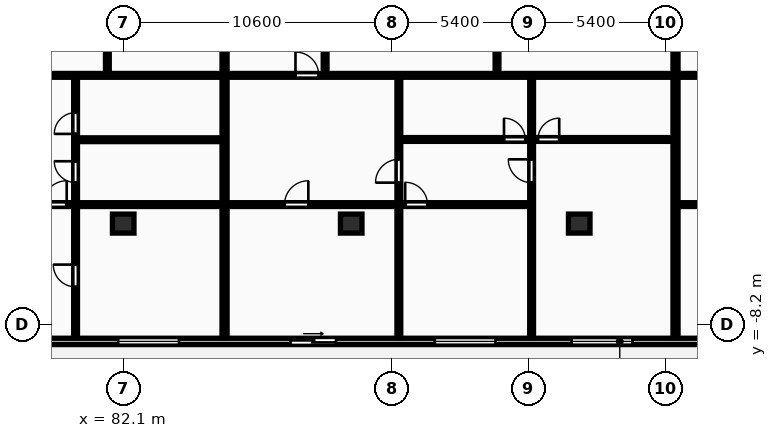
"""IFC4 building model, lengths in metres.
Left out: names, types, materials, properties, quantities, classifications, styles, units other than length and angle.
Written with IfcOpenShell. Run it as: python <this file> out.ifc"""

import sys

from ifc_helpers import new_model, si_unit, direction, frame, frame_2d, origin, origin_2d, place, context, subcontext, project, spatial, rectangle, extrude, element, fill, save


model = new_model("IFC4")
c1 = context("Model", 3, precision=1e-05, world=origin(), true_north=direction((0.0, 1.0)))
c2 = subcontext(c1, "Body", "Model", "MODEL_VIEW")
j1 = project(units=[si_unit("LENGTHUNIT", "METRE"), si_unit("PLANEANGLEUNIT", "RADIAN")], contexts=[c1])
p1 = place(None, origin())
s1 = spatial("IfcSite", under=j1, at=p1, CompositionType="ELEMENT")
p2 = place(p1, origin())
s2 = spatial("IfcBuilding", under=s1, at=p2, CompositionType="ELEMENT")
p3 = place(p2, frame((0.0, 0.0, 87.3)))
s3 = spatial("IfcBuildingStorey", under=s2, at=p3, CompositionType="ELEMENT", Elevation=87.3)
for number, where, z_axis, x_axis in (
    (1, (82.1, -4.2, 0.0), (0.0, 0.0, 1.0), (1.0, 0.0, 0.0)),
    (2, (91.1, -4.2, 0.0), (0.0, 0.0, 1.0), (1.0, 0.0, 0.0)),
    (3, (100.1, -4.2, 0.0), (0.0, 0.0, 1.0), (1.0, 0.0, 0.0)),
):
    element("IfcColumn", number, at=place(p3, frame(where, z_axis=z_axis, x_axis=x_axis)), inside=s3, PredefinedType="COLUMN", context=c2, shape_type="SweptSolid", body=[
        extrude(rectangle(XDim=0.85, YDim=0.75, at=origin_2d()), origin(), (0.0, 0.0, 1.0), 3.25),
    ])
p4 = place(p3, frame((72.7, -8.85, 0.0), z_axis=(0.0, 0.0, 1.0), x_axis=(1.0, 0.0, 0.0)))
e4 = element("IfcWall", 4, at=p4, inside=s3, PredefinedType="STANDARD", context=c2, shape_type="SweptSolid", body=[
    extrude(rectangle(XDim=58.0, YDim=0.25, at=frame_2d((29.0, 0.0))), origin(), (0.0, 0.0, 1.0), 2.97),
])
p5 = place(p4, frame((2.92, 0.0, 0.0)))
e5 = element("IfcOpeningElement", 5, at=p5, cuts=e4, PredefinedType="OPENING", context=c2, shape_type="SweptSolid", body=[
    extrude(rectangle(XDim=1.8, YDim=2.2, at=frame_2d((0.9, 1.1))), frame((0.0, 0.135, 0.0), z_axis=(0.0, -1.0, 0.0), x_axis=(1.0, 0.0, 0.0)), (0.0, 0.0, 1.0), 0.27),
])
p6 = place(p4, frame((9.2, 0.0, 0.85)))
e6 = element("IfcOpeningElement", 6, at=p6, cuts=e4, PredefinedType="OPENING", context=c2, shape_type="SweptSolid", body=[
    extrude(rectangle(XDim=2.4, YDim=1.9, at=frame_2d((1.2, 0.95))), frame((0.0, 0.135, 0.0), z_axis=(0.0, -1.0, 0.0), x_axis=(1.0, 0.0, 0.0)), (0.0, 0.0, 1.0), 0.27),
])
p7 = place(p4, frame((21.7, 0.0, 0.85)))
e7 = element("IfcOpeningElement", 7, at=p7, cuts=e4, PredefinedType="OPENING", context=c2, shape_type="SweptSolid", body=[
    extrude(rectangle(XDim=2.4, YDim=1.9, at=frame_2d((1.2, 0.95))), frame((0.0, 0.135, 0.0), z_axis=(0.0, -1.0, 0.0), x_axis=(1.0, 0.0, 0.0)), (0.0, 0.0, 1.0), 0.27),
])
p8 = place(p4, frame((16.0, 0.0, 0.0)))
e8 = element("IfcOpeningElement", 8, at=p8, cuts=e4, PredefinedType="OPENING", context=c2, shape_type="SweptSolid", body=[
    extrude(rectangle(XDim=1.8, YDim=2.2, at=frame_2d((0.9, 1.1))), frame((0.0, 0.135, 0.0), z_axis=(0.0, -1.0, 0.0), x_axis=(1.0, 0.0, 0.0)), (0.0, 0.0, 1.0), 0.27),
])
p9 = place(p4, frame((27.1, 0.0, 0.85)))
e9 = element("IfcOpeningElement", 9, at=p9, cuts=e4, PredefinedType="OPENING", context=c2, shape_type="SweptSolid", body=[
    extrude(rectangle(XDim=2.4, YDim=1.9, at=frame_2d((1.2, 0.95))), frame((0.0, 0.135, 0.0), z_axis=(0.0, -1.0, 0.0), x_axis=(1.0, 0.0, 0.0)), (0.0, 0.0, 1.0), 0.27),
])
p10 = place(p4, frame((35.85, 0.0, 0.0)))
e10 = element("IfcOpeningElement", 10, at=p10, cuts=e4, PredefinedType="OPENING", context=c2, shape_type="SweptSolid", body=[
    extrude(rectangle(XDim=1.8, YDim=2.2, at=frame_2d((0.9, 1.1))), frame((0.0, 0.135, 0.0), z_axis=(0.0, -1.0, 0.0), x_axis=(1.0, 0.0, 0.0)), (0.0, 0.0, 1.0), 0.27),
])
p11 = place(p4, frame((42.93, 0.0, 0.85)))
e11 = element("IfcOpeningElement", 11, at=p11, cuts=e4, PredefinedType="OPENING", context=c2, shape_type="SweptSolid", body=[
    extrude(rectangle(XDim=1.8, YDim=1.8, at=frame_2d((0.9, 0.9))), frame((0.0, 0.135, 0.0), z_axis=(0.0, -1.0, 0.0), x_axis=(1.0, 0.0, 0.0)), (0.0, 0.0, 1.0), 0.27),
])
p12 = place(p4, frame((49.12, 0.0, 0.0)))
e12 = element("IfcOpeningElement", 12, at=p12, cuts=e4, PredefinedType="OPENING", context=c2, shape_type="SweptSolid", body=[
    extrude(rectangle(XDim=1.8, YDim=2.2, at=frame_2d((0.9, 1.1))), frame((0.0, 0.135, 0.0), z_axis=(0.0, -1.0, 0.0), x_axis=(1.0, 0.0, 0.0)), (0.0, 0.0, 1.0), 0.27),
])
p13 = place(p4, frame((54.9, 0.0, 0.85)))
e13 = element("IfcOpeningElement", 13, at=p13, cuts=e4, PredefinedType="OPENING", context=c2, shape_type="SweptSolid", body=[
    extrude(rectangle(XDim=2.4, YDim=1.9, at=frame_2d((1.2, 0.95))), frame((0.0, 0.135, 0.0), z_axis=(0.0, -1.0, 0.0), x_axis=(1.0, 0.0, 0.0)), (0.0, 0.0, 1.0), 0.27),
])
p14 = place(p3, frame((86.1, -8.7, 0.0), z_axis=(0.0, 0.0, 1.0), x_axis=(0.0, 1.0, 0.0)))
e14 = element("IfcWall", 14, at=p14, inside=s3, PredefinedType="PARTITIONING", context=c2, shape_type="SweptSolid", body=[
    extrude(rectangle(XDim=24.87, YDim=0.2, at=frame_2d((12.435, 0.0))), origin(), (0.0, 0.0, 1.0), 2.97),
])
p15 = place(p3, frame((81.475, 1.69, 0.0), z_axis=(0.0, 0.0, 1.0), x_axis=(0.0, 1.0, 0.0)))
e15 = element("IfcWall", 15, at=p15, inside=s3, PredefinedType="PARTITIONING", context=c2, shape_type="SweptSolid", body=[
    extrude(rectangle(XDim=7.25, YDim=0.15, at=frame_2d((3.625, 0.0))), origin(), (0.0, 0.0, 1.0), 2.97),
])
p16 = place(p15, frame((2.558, 0.0, 0.0)))
e16 = element("IfcOpeningElement", 16, at=p16, cuts=e15, PredefinedType="OPENING", context=c2, shape_type="SweptSolid", body=[
    extrude(rectangle(XDim=0.84, YDim=2.04, at=frame_2d((0.42, 1.02))), frame((0.0, 0.085, 0.0), z_axis=(0.0, -1.0, 0.0), x_axis=(1.0, 0.0, 0.0)), (0.0, 0.0, 1.0), 0.17),
])
p17 = place(p3, frame((80.28, -0.89, 0.0), z_axis=(0.0, 0.0, 1.0), x_axis=(1.0, 0.0, 0.0)))
e17 = element("IfcWall", 17, at=p17, inside=s3, PredefinedType="PARTITIONING", context=c2, shape_type="SweptSolid", body=[
    extrude(rectangle(XDim=5.74, YDim=0.15, at=frame_2d((2.87, 0.0))), origin(), (0.0, 0.0, 1.0), 2.97),
])
p18 = place(p3, frame((80.22, -8.7, 0.0), z_axis=(0.0, 0.0, 1.0), x_axis=(0.0, 1.0, 0.0)))
e18 = element("IfcWall", 18, at=p18, inside=s3, PredefinedType="PARTITIONING", context=c2, shape_type="SweptSolid", body=[
    extrude(rectangle(XDim=10.31, YDim=0.15, at=frame_2d((5.155, 0.0))), origin(), (0.0, 0.0, 1.0), 2.97),
])
p19 = place(p18, frame((6.12, 0.0, 0.0)))
e19 = element("IfcOpeningElement", 19, at=p19, cuts=e18, PredefinedType="OPENING", context=c2, shape_type="SweptSolid", body=[
    extrude(rectangle(XDim=0.84, YDim=2.04, at=frame_2d((0.42, 1.02))), frame((0.0, 0.085, 0.0), z_axis=(0.0, -1.0, 0.0), x_axis=(1.0, 0.0, 0.0)), (0.0, 0.0, 1.0), 0.17),
])
p20 = place(p18, frame((8.04, 0.0, 0.0)))
e20 = element("IfcOpeningElement", 20, at=p20, cuts=e18, PredefinedType="OPENING", context=c2, shape_type="SweptSolid", body=[
    extrude(rectangle(XDim=0.84, YDim=2.04, at=frame_2d((0.42, 1.02))), frame((0.0, 0.085, 0.0), z_axis=(0.0, -1.0, 0.0), x_axis=(1.0, 0.0, 0.0)), (0.0, 0.0, 1.0), 0.17),
])
p21 = place(p18, frame((2.001, 0.0, 0.0)))
e21 = element("IfcOpeningElement", 21, at=p21, cuts=e18, PredefinedType="OPENING", context=c2, shape_type="SweptSolid", body=[
    extrude(rectangle(XDim=0.88, YDim=2.06, at=frame_2d((0.44, 1.03))), frame((0.0, 0.085, 0.0), z_axis=(0.0, -1.0, 0.0), x_axis=(1.0, 0.0, 0.0)), (0.0, 0.0, 1.0), 0.17),
])
p22 = place(p3, frame((72.78, 1.65, 0.0), z_axis=(0.0, 0.0, 1.0), x_axis=(1.0, 0.0, 0.0)))
e22 = element("IfcWall", 22, at=p22, inside=s3, PredefinedType="PARTITIONING", context=c2, shape_type="SweptSolid", body=[
    extrude(rectangle(XDim=13.24, YDim=0.15, at=frame_2d((6.62, 0.0))), origin(), (0.0, 0.0, 1.0), 2.97),
])
p23 = place(p22, frame((2.72, 0.0, 0.0)))
e23 = element("IfcOpeningElement", 23, at=p23, cuts=e22, PredefinedType="OPENING", context=c2, shape_type="SweptSolid", body=[
    extrude(rectangle(XDim=0.92, YDim=2.08, at=frame_2d((0.46, 1.04))), frame((0.0, 0.085, 0.0), z_axis=(0.0, -1.0, 0.0), x_axis=(1.0, 0.0, 0.0)), (0.0, 0.0, 1.0), 0.17),
])
p24 = place(p3, frame((72.78, -3.45, 0.0), z_axis=(0.0, 0.0, 1.0), x_axis=(1.0, 0.0, 0.0)))
e24 = element("IfcWall", 24, at=p24, inside=s3, PredefinedType="PARTITIONING", context=c2, shape_type="SweptSolid", body=[
    extrude(rectangle(XDim=13.24, YDim=0.15, at=frame_2d((6.62, 0.0))), origin(), (0.0, 0.0, 1.0), 2.97),
])
p25 = place(p24, frame((6.15, 0.0, 0.0)))
e25 = element("IfcOpeningElement", 25, at=p25, cuts=e24, PredefinedType="OPENING", context=c2, shape_type="SweptSolid", body=[
    extrude(rectangle(XDim=0.94, YDim=2.1, at=frame_2d((0.47, 1.05))), frame((0.0, 0.085, 0.0), z_axis=(0.0, -1.0, 0.0), x_axis=(1.0, 0.0, 0.0)), (0.0, 0.0, 1.0), 0.17),
])
p26 = place(p3, frame((103.9, -8.7, 0.0), z_axis=(0.0, 0.0, 1.0), x_axis=(0.0, 1.0, 0.0)))
e26 = element("IfcWall", 26, at=p26, inside=s3, PredefinedType="PARTITIONING", context=c2, shape_type="SweptSolid", body=[
    extrude(rectangle(XDim=24.87, YDim=0.2, at=frame_2d((12.435, 0.0))), origin(), (0.0, 0.0, 1.0), 2.97),
])
p27 = place(p3, frame((96.855, 1.69, 0.0), z_axis=(0.0, 0.0, 1.0), x_axis=(0.0, 1.0, 0.0)))
e27 = element("IfcWall", 27, at=p27, inside=s3, PredefinedType="PARTITIONING", context=c2, shape_type="SweptSolid", body=[
    extrude(rectangle(XDim=14.5, YDim=0.15, at=frame_2d((7.25, 0.0))), origin(), (0.0, 0.0, 1.0), 2.97),
])
p28 = place(p27, frame((6.34, 0.0, 0.0)))
e28 = element("IfcOpeningElement", 28, at=p28, cuts=e27, PredefinedType="OPENING", context=c2, shape_type="SweptSolid", body=[
    extrude(rectangle(XDim=0.84, YDim=2.04, at=frame_2d((0.42, 1.02))), frame((0.0, 0.085, 0.0), z_axis=(0.0, -1.0, 0.0), x_axis=(1.0, 0.0, 0.0)), (0.0, 0.0, 1.0), 0.17),
])
p29 = place(p27, frame((7.68, 0.0, 0.0)))
e29 = element("IfcOpeningElement", 29, at=p29, cuts=e27, PredefinedType="OPENING", context=c2, shape_type="SweptSolid", body=[
    extrude(rectangle(XDim=0.88, YDim=2.06, at=frame_2d((0.44, 1.03))), frame((0.0, 0.085, 0.0), z_axis=(0.0, -1.0, 0.0), x_axis=(1.0, 0.0, 0.0)), (0.0, 0.0, 1.0), 0.17),
])
p30 = place(p3, frame((90.07, 1.69, 0.0), z_axis=(0.0, 0.0, 1.0), x_axis=(0.0, 1.0, 0.0)))
e30 = element("IfcWall", 30, at=p30, inside=s3, PredefinedType="PARTITIONING", context=c2, shape_type="SweptSolid", body=[
    extrude(rectangle(XDim=14.5, YDim=0.15, at=frame_2d((7.25, 0.0))), origin(), (0.0, 0.0, 1.0), 2.97),
])
p31 = place(p30, frame((2.611, 0.0, 0.0)))
e31 = element("IfcOpeningElement", 31, at=p31, cuts=e30, PredefinedType="OPENING", context=c2, shape_type="SweptSolid", body=[
    extrude(rectangle(XDim=0.88, YDim=2.06, at=frame_2d((0.44, 1.03))), frame((0.0, 0.085, 0.0), z_axis=(0.0, -1.0, 0.0), x_axis=(1.0, 0.0, 0.0)), (0.0, 0.0, 1.0), 0.17),
])
p32 = place(p3, frame((92.98, -8.7, 0.0), z_axis=(0.0, 0.0, 1.0), x_axis=(0.0, 1.0, 0.0)))
e32 = element("IfcWall", 32, at=p32, inside=s3, PredefinedType="PARTITIONING", context=c2, shape_type="SweptSolid", body=[
    extrude(rectangle(XDim=10.31, YDim=0.15, at=frame_2d((5.155, 0.0))), origin(), (0.0, 0.0, 1.0), 2.97),
])
p33 = place(p32, frame((6.116, 0.0, 0.0)))
e33 = element("IfcOpeningElement", 33, at=p33, cuts=e32, PredefinedType="OPENING", context=c2, shape_type="SweptSolid", body=[
    extrude(rectangle(XDim=0.92, YDim=2.08, at=frame_2d((0.46, 1.04))), frame((0.0, 0.085, 0.0), z_axis=(0.0, -1.0, 0.0), x_axis=(1.0, 0.0, 0.0)), (0.0, 0.0, 1.0), 0.17),
])
p34 = place(p3, frame((98.22, -0.86, 0.0), z_axis=(0.0, 0.0, 1.0), x_axis=(0.0, 1.0, 0.0)))
e34 = element("IfcWall", 34, at=p34, inside=s3, PredefinedType="PARTITIONING", context=c2, shape_type="SweptSolid", body=[
    extrude(rectangle(XDim=2.47, YDim=0.15, at=frame_2d((1.235, 0.0))), origin(), (0.0, 0.0, 1.0), 2.97),
])
p35 = place(p3, frame((98.22, -8.7, 0.0), z_axis=(0.0, 0.0, 1.0), x_axis=(0.0, 1.0, 0.0)))
e35 = element("IfcWall", 35, at=p35, inside=s3, PredefinedType="PARTITIONING", context=c2, shape_type="SweptSolid", body=[
    extrude(rectangle(XDim=7.8, YDim=0.15, at=frame_2d((3.9, 0.0))), origin(), (0.0, 0.0, 1.0), 2.97),
])
p36 = place(p35, frame((6.116, 0.0, 0.0)))
e36 = element("IfcOpeningElement", 36, at=p36, cuts=e35, PredefinedType="OPENING", context=c2, shape_type="SweptSolid", body=[
    extrude(rectangle(XDim=0.92, YDim=2.08, at=frame_2d((0.46, 1.04))), frame((0.0, 0.085, 0.0), z_axis=(0.0, -1.0, 0.0), x_axis=(1.0, 0.0, 0.0)), (0.0, 0.0, 1.0), 0.17),
])
p37 = place(p3, frame((93.02, -0.88, 0.0), z_axis=(0.0, 0.0, 1.0), x_axis=(1.0, 0.0, 0.0)))
e37 = element("IfcWall", 37, at=p37, inside=s3, PredefinedType="PARTITIONING", context=c2, shape_type="SweptSolid", body=[
    extrude(rectangle(XDim=10.8, YDim=0.15, at=frame_2d((5.4, 0.0))), origin(), (0.0, 0.0, 1.0), 2.97),
])
p38 = place(p37, frame((4.11, 0.0, 0.0)))
e38 = element("IfcOpeningElement", 38, at=p38, cuts=e37, PredefinedType="OPENING", context=c2, shape_type="SweptSolid", body=[
    extrude(rectangle(XDim=0.84, YDim=2.04, at=frame_2d((0.42, 1.02))), frame((0.0, 0.085, 0.0), z_axis=(0.0, -1.0, 0.0), x_axis=(1.0, 0.0, 0.0)), (0.0, 0.0, 1.0), 0.17),
])
p39 = place(p37, frame((5.45, 0.0, 0.0)))
e39 = element("IfcOpeningElement", 39, at=p39, cuts=e37, PredefinedType="OPENING", context=c2, shape_type="SweptSolid", body=[
    extrude(rectangle(XDim=0.84, YDim=2.04, at=frame_2d((0.42, 1.02))), frame((0.0, 0.085, 0.0), z_axis=(0.0, -1.0, 0.0), x_axis=(1.0, 0.0, 0.0)), (0.0, 0.0, 1.0), 0.17),
])
p40 = place(p3, frame((86.18, 1.65, 0.0), z_axis=(0.0, 0.0, 1.0), x_axis=(1.0, 0.0, 0.0)))
e40 = element("IfcWall", 40, at=p40, inside=s3, PredefinedType="PARTITIONING", context=c2, shape_type="SweptSolid", body=[
    extrude(rectangle(XDim=17.64, YDim=0.15, at=frame_2d((8.82, 0.0))), origin(), (0.0, 0.0, 1.0), 2.97),
])
p41 = place(p40, frame((2.72, 0.0, 0.0)))
e41 = element("IfcOpeningElement", 41, at=p41, cuts=e40, PredefinedType="OPENING", context=c2, shape_type="SweptSolid", body=[
    extrude(rectangle(XDim=0.92, YDim=2.08, at=frame_2d((0.46, 1.04))), frame((0.0, 0.085, 0.0), z_axis=(0.0, -1.0, 0.0), x_axis=(1.0, 0.0, 0.0)), (0.0, 0.0, 1.0), 0.17),
])
p42 = place(p3, frame((86.18, -3.45, 0.0), z_axis=(0.0, 0.0, 1.0), x_axis=(1.0, 0.0, 0.0)))
e42 = element("IfcWall", 42, at=p42, inside=s3, PredefinedType="PARTITIONING", context=c2, shape_type="SweptSolid", body=[
    extrude(rectangle(XDim=12.04, YDim=0.15, at=frame_2d((6.02, 0.0))), origin(), (0.0, 0.0, 1.0), 2.97),
])
p43 = place(p42, frame((2.287, 0.0, 0.0)))
e43 = element("IfcOpeningElement", 43, at=p43, cuts=e42, PredefinedType="OPENING", context=c2, shape_type="SweptSolid", body=[
    extrude(rectangle(XDim=0.94, YDim=2.1, at=frame_2d((0.47, 1.05))), frame((0.0, 0.085, 0.0), z_axis=(0.0, -1.0, 0.0), x_axis=(1.0, 0.0, 0.0)), (0.0, 0.0, 1.0), 0.17),
])
p44 = place(p42, frame((7.05, 0.0, 0.0)))
e44 = element("IfcOpeningElement", 44, at=p44, cuts=e42, PredefinedType="OPENING", context=c2, shape_type="SweptSolid", body=[
    extrude(rectangle(XDim=0.88, YDim=2.06, at=frame_2d((0.44, 1.03))), frame((0.0, 0.085, 0.0), z_axis=(0.0, -1.0, 0.0), x_axis=(1.0, 0.0, 0.0)), (0.0, 0.0, 1.0), 0.17),
])
p45 = place(p3, frame((103.98, 1.65, 0.0), z_axis=(0.0, 0.0, 1.0), x_axis=(1.0, 0.0, 0.0)))
e45 = element("IfcWall", 45, at=p45, inside=s3, PredefinedType="PARTITIONING", context=c2, shape_type="SweptSolid", body=[
    extrude(rectangle(XDim=14.24, YDim=0.15, at=frame_2d((7.12, 0.0))), origin(), (0.0, 0.0, 1.0), 2.97),
])
p46 = place(p45, frame((2.72, 0.0, 0.0)))
e46 = element("IfcOpeningElement", 46, at=p46, cuts=e45, PredefinedType="OPENING", context=c2, shape_type="SweptSolid", body=[
    extrude(rectangle(XDim=0.92, YDim=2.08, at=frame_2d((0.46, 1.04))), frame((0.0, 0.085, 0.0), z_axis=(0.0, -1.0, 0.0), x_axis=(1.0, 0.0, 0.0)), (0.0, 0.0, 1.0), 0.17),
])
p47 = place(p3, frame((103.98, -3.45, 0.0), z_axis=(0.0, 0.0, 1.0), x_axis=(1.0, 0.0, 0.0)))
e47 = element("IfcWall", 47, at=p47, inside=s3, PredefinedType="PARTITIONING", context=c2, shape_type="SweptSolid", body=[
    extrude(rectangle(XDim=14.24, YDim=0.15, at=frame_2d((7.12, 0.0))), origin(), (0.0, 0.0, 1.0), 2.97),
])
p48 = place(p47, frame((6.872, 0.0, 0.0)))
e48 = element("IfcOpeningElement", 48, at=p48, cuts=e47, PredefinedType="OPENING", context=c2, shape_type="SweptSolid", body=[
    extrude(rectangle(XDim=0.94, YDim=2.1, at=frame_2d((0.47, 1.05))), frame((0.0, 0.085, 0.0), z_axis=(0.0, -1.0, 0.0), x_axis=(1.0, 0.0, 0.0)), (0.0, 0.0, 1.0), 0.17),
])
p49 = place(p6, origin())
e49 = element("IfcWindow", 49, at=p49, inside=s3, PartitioningType="DOUBLE_PANEL_VERTICAL", PredefinedType="WINDOW", context=c2, shape_type="SweptSolid", body=[
    extrude(rectangle(XDim=2.4, YDim=1.9, at=frame_2d((1.2, 0.95))), frame((0.0, 0.03, 0.0), z_axis=(0.0, -1.0, 0.0), x_axis=(1.0, 0.0, 0.0)), (0.0, 0.0, 1.0), 0.06),
])
fill(e6, e49)
p50 = place(p7, origin())
e50 = element("IfcWindow", 50, at=p50, inside=s3, PartitioningType="DOUBLE_PANEL_VERTICAL", PredefinedType="WINDOW", context=c2, shape_type="SweptSolid", body=[
    extrude(rectangle(XDim=2.4, YDim=1.9, at=frame_2d((1.2, 0.95))), frame((0.0, 0.03, 0.0), z_axis=(0.0, -1.0, 0.0), x_axis=(1.0, 0.0, 0.0)), (0.0, 0.0, 1.0), 0.06),
])
fill(e7, e50)
p51 = place(p8, origin())
e51 = element("IfcDoor", 51, at=p51, inside=s3, OperationType="SLIDING_TO_RIGHT", PredefinedType="DOOR", context=c2, shape_type="SweptSolid", body=[
    extrude(rectangle(XDim=1.8, YDim=2.2, at=frame_2d((0.9, 1.1))), frame((0.0, 0.025, 0.0), z_axis=(0.0, -1.0, 0.0), x_axis=(1.0, 0.0, 0.0)), (0.0, 0.0, 1.0), 0.05),
])
fill(e8, e51)
p52 = place(p9, origin())
e52 = element("IfcWindow", 52, at=p52, inside=s3, PartitioningType="DOUBLE_PANEL_VERTICAL", PredefinedType="WINDOW", context=c2, shape_type="SweptSolid", body=[
    extrude(rectangle(XDim=2.4, YDim=1.9, at=frame_2d((1.2, 0.95))), frame((0.0, 0.03, 0.0), z_axis=(0.0, -1.0, 0.0), x_axis=(1.0, 0.0, 0.0)), (0.0, 0.0, 1.0), 0.06),
])
fill(e9, e52)
p53 = place(p19, origin())
e53 = element("IfcDoor", 53, at=p53, inside=s3, OperationType="SINGLE_SWING_RIGHT", PredefinedType="DOOR", context=c2, shape_type="SweptSolid", body=[
    extrude(rectangle(XDim=0.84, YDim=2.04, at=frame_2d((0.42, 1.02))), frame((0.0, 0.025, 0.0), z_axis=(0.0, -1.0, 0.0), x_axis=(1.0, 0.0, 0.0)), (0.0, 0.0, 1.0), 0.05),
])
fill(e19, e53)
p54 = place(p20, origin())
e54 = element("IfcDoor", 54, at=p54, inside=s3, OperationType="SINGLE_SWING_LEFT", PredefinedType="DOOR", context=c2, shape_type="SweptSolid", body=[
    extrude(rectangle(XDim=0.84, YDim=2.04, at=frame_2d((0.42, 1.02))), frame((0.0, 0.025, 0.0), z_axis=(0.0, -1.0, 0.0), x_axis=(1.0, 0.0, 0.0)), (0.0, 0.0, 1.0), 0.05),
])
fill(e20, e54)
p55 = place(p21, origin())
e55 = element("IfcDoor", 55, at=p55, inside=s3, OperationType="SINGLE_SWING_RIGHT", PredefinedType="DOOR", context=c2, shape_type="SweptSolid", body=[
    extrude(rectangle(XDim=0.88, YDim=2.06, at=frame_2d((0.44, 1.03))), frame((0.0, 0.025, 0.0), z_axis=(0.0, -1.0, 0.0), x_axis=(1.0, 0.0, 0.0)), (0.0, 0.0, 1.0), 0.05),
])
fill(e21, e55)
p56 = place(p25, origin())
e56 = element("IfcDoor", 56, at=p56, inside=s3, OperationType="SINGLE_SWING_RIGHT", PredefinedType="DOOR", context=c2, shape_type="SweptSolid", body=[
    extrude(rectangle(XDim=0.94, YDim=2.1, at=frame_2d((0.47, 1.05))), frame((0.0, 0.025, 0.0), z_axis=(0.0, -1.0, 0.0), x_axis=(1.0, 0.0, 0.0)), (0.0, 0.0, 1.0), 0.05),
])
fill(e25, e56)
p57 = place(p33, origin())
e57 = element("IfcDoor", 57, at=p57, inside=s3, OperationType="SINGLE_SWING_LEFT", PredefinedType="DOOR", context=c2, shape_type="SweptSolid", body=[
    extrude(rectangle(XDim=0.92, YDim=2.08, at=frame_2d((0.46, 1.04))), frame((0.0, 0.025, 0.0), z_axis=(0.0, -1.0, 0.0), x_axis=(1.0, 0.0, 0.0)), (0.0, 0.0, 1.0), 0.05),
])
fill(e33, e57)
p58 = place(p36, origin())
e58 = element("IfcDoor", 58, at=p58, inside=s3, OperationType="SINGLE_SWING_RIGHT", PredefinedType="DOOR", context=c2, shape_type="SweptSolid", body=[
    extrude(rectangle(XDim=0.92, YDim=2.08, at=frame_2d((0.46, 1.04))), frame((0.0, 0.025, 0.0), z_axis=(0.0, -1.0, 0.0), x_axis=(1.0, 0.0, 0.0)), (0.0, 0.0, 1.0), 0.05),
])
fill(e36, e58)
p59 = place(p38, origin())
e59 = element("IfcDoor", 59, at=p59, inside=s3, OperationType="SINGLE_SWING_LEFT", PredefinedType="DOOR", context=c2, shape_type="SweptSolid", body=[
    extrude(rectangle(XDim=0.84, YDim=2.04, at=frame_2d((0.42, 1.02))), frame((0.0, 0.025, 0.0), z_axis=(0.0, -1.0, 0.0), x_axis=(1.0, 0.0, 0.0)), (0.0, 0.0, 1.0), 0.05),
])
fill(e38, e59)
p60 = place(p39, origin())
e60 = element("IfcDoor", 60, at=p60, inside=s3, OperationType="SINGLE_SWING_RIGHT", PredefinedType="DOOR", context=c2, shape_type="SweptSolid", body=[
    extrude(rectangle(XDim=0.84, YDim=2.04, at=frame_2d((0.42, 1.02))), frame((0.0, 0.025, 0.0), z_axis=(0.0, -1.0, 0.0), x_axis=(1.0, 0.0, 0.0)), (0.0, 0.0, 1.0), 0.05),
])
fill(e39, e60)
p61 = place(p41, origin())
e61 = element("IfcDoor", 61, at=p61, inside=s3, OperationType="SINGLE_SWING_LEFT", PredefinedType="DOOR", context=c2, shape_type="SweptSolid", body=[
    extrude(rectangle(XDim=0.92, YDim=2.08, at=frame_2d((0.46, 1.04))), frame((0.0, 0.025, 0.0), z_axis=(0.0, -1.0, 0.0), x_axis=(1.0, 0.0, 0.0)), (0.0, 0.0, 1.0), 0.05),
])
fill(e41, e61)
p62 = place(p43, origin())
e62 = element("IfcDoor", 62, at=p62, inside=s3, OperationType="SINGLE_SWING_RIGHT", PredefinedType="DOOR", context=c2, shape_type="SweptSolid", body=[
    extrude(rectangle(XDim=0.94, YDim=2.1, at=frame_2d((0.47, 1.05))), frame((0.0, 0.025, 0.0), z_axis=(0.0, -1.0, 0.0), x_axis=(1.0, 0.0, 0.0)), (0.0, 0.0, 1.0), 0.05),
])
fill(e43, e62)
p63 = place(p44, origin())
e63 = element("IfcDoor", 63, at=p63, inside=s3, OperationType="SINGLE_SWING_LEFT", PredefinedType="DOOR", context=c2, shape_type="SweptSolid", body=[
    extrude(rectangle(XDim=0.88, YDim=2.06, at=frame_2d((0.44, 1.03))), frame((0.0, 0.025, 0.0), z_axis=(0.0, -1.0, 0.0), x_axis=(1.0, 0.0, 0.0)), (0.0, 0.0, 1.0), 0.05),
])
fill(e44, e63)
save(model, sys.argv[1])
